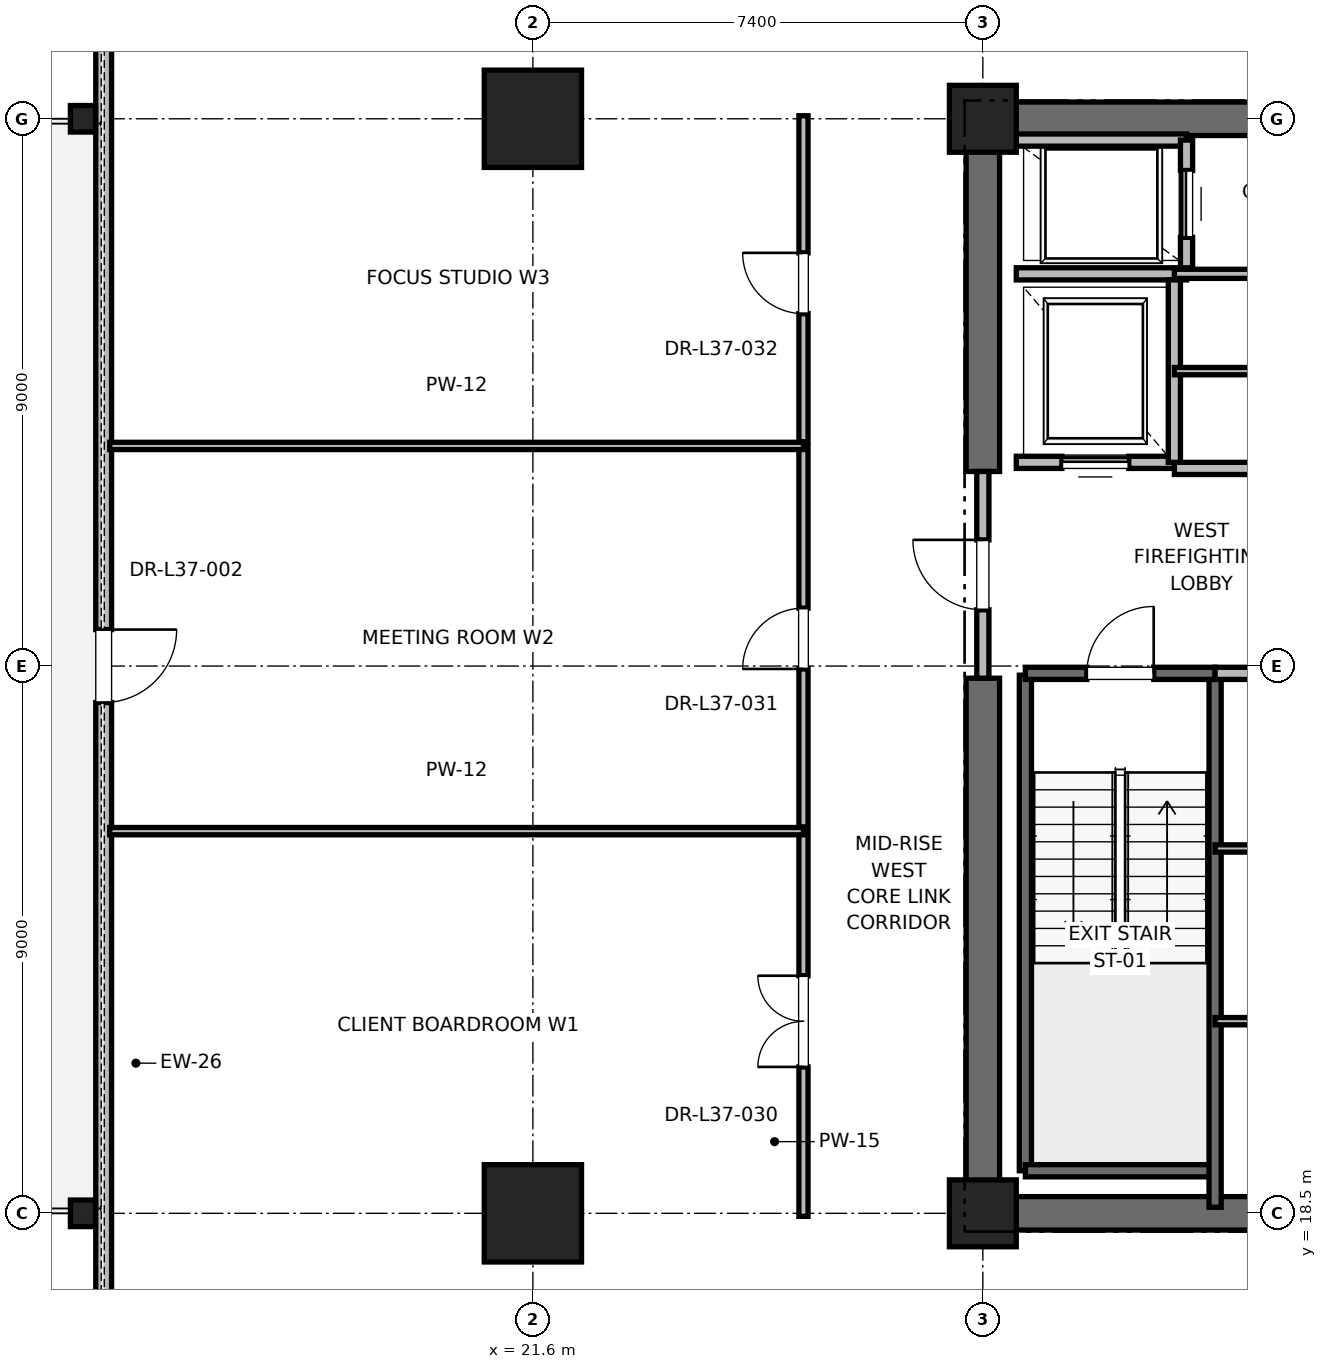
"""IFC4 building model, lengths in metres.
Left out: names, types, materials, properties, quantities, classifications, styles, units other than length and angle.
Written with IfcOpenShell. Run it as: python <this file> out.ifc"""

import sys

from ifc_helpers import new_model, si_unit, direction, frame, frame_2d, origin, origin_2d, place, context, subcontext, project, spatial, rectangle, i_section, extrude, element, fill, save


model = new_model("IFC4")
c1 = context("Model", 3, precision=1e-05, world=origin(), true_north=direction((0.0, 1.0)))
c2 = subcontext(c1, "Body", "Model", "MODEL_VIEW")
j1 = project(units=[si_unit("LENGTHUNIT", "METRE"), si_unit("PLANEANGLEUNIT", "RADIAN")], contexts=[c1])
p1 = place(None, origin())
s1 = spatial("IfcSite", under=j1, at=p1, CompositionType="ELEMENT")
p2 = place(p1, origin())
s2 = spatial("IfcBuilding", under=s1, at=p2, CompositionType="ELEMENT")
p3 = place(p2, frame((0.0, 0.0, 160.4)))
s3 = spatial("IfcBuildingStorey", under=s2, at=p3, CompositionType="ELEMENT", Elevation=160.4)
for number, where, z_axis, x_axis in (
    (1, (21.6, 18.5, 0.0), (0.0, 0.0, 1.0), (1.0, 0.0, 0.0)),
    (2, (21.6, 36.5, 0.0), (0.0, 0.0, 1.0), (1.0, 0.0, 0.0)),
):
    element("IfcColumn", number, at=place(p3, frame(where, z_axis=z_axis, x_axis=x_axis)), inside=s3, PredefinedType="COLUMN", context=c2, shape_type="SweptSolid", body=[
        extrude(rectangle(XDim=1.6, YDim=1.6, at=origin_2d()), origin(), (0.0, 0.0, 1.0), 4.0),
    ])
for number, where, z_axis, x_axis in (
    (3, (14.2, 18.5, 0.0), (0.0, 0.0, 1.0), (1.0, 0.0, 0.0)),
    (4, (14.2, 36.5, 0.0), (0.0, 0.0, 1.0), (1.0, 0.0, 0.0)),
):
    element("IfcColumn", number, at=place(p3, frame(where, z_axis=z_axis, x_axis=x_axis)), inside=s3, PredefinedType="COLUMN", context=c2, shape_type="SweptSolid", body=[
        extrude(i_section(OverallWidth=0.412, OverallDepth=0.437, WebThickness=0.036, FlangeThickness=0.058, FilletRadius=0.015, at=origin_2d()), origin(), (0.0, 0.0, 1.0), 4.0),
    ])
for number, where, z_axis, x_axis in (
    (5, (29.0, 18.5, 0.0), (0.0, 0.0, 1.0), (1.0, 0.0, 0.0)),
    (6, (29.0, 36.5, 0.0), (0.0, 0.0, 1.0), (1.0, 0.0, 0.0)),
):
    element("IfcColumn", number, at=place(p3, frame(where, z_axis=z_axis, x_axis=x_axis)), inside=s3, PredefinedType="PILASTER", context=c2, shape_type="SweptSolid", body=[
        extrude(rectangle(XDim=1.1, YDim=1.1, at=origin_2d()), origin(), (0.0, 0.0, 1.0), 4.0),
    ])
p4 = place(p3, frame((29.0, 18.5, 0.0), z_axis=(0.0, 0.0, 1.0), x_axis=(1.0, 0.0, 0.0)))
e7 = element("IfcWall", 7, at=p4, inside=s3, PredefinedType="SHEAR", context=c2, shape_type="SweptSolid", body=[
    extrude(rectangle(XDim=9.2, YDim=0.55, at=frame_2d((4.6, 0.0))), origin(), (0.0, 0.0, 1.0), 3.775),
])
p5 = place(p3, frame((29.0, 36.5, 0.0), z_axis=(0.0, 0.0, 1.0), x_axis=(1.0, 0.0, 0.0)))
e8 = element("IfcWall", 8, at=p5, inside=s3, PredefinedType="SHEAR", context=c2, shape_type="SweptSolid", body=[
    extrude(rectangle(XDim=5.8, YDim=0.55, at=frame_2d((2.9, 0.0))), origin(), (0.0, 0.0, 1.0), 3.775),
])
p6 = place(p3, frame((29.0, 18.5, 0.0), z_axis=(0.0, 0.0, 1.0), x_axis=(0.0, 1.0, 0.0)))
e9 = element("IfcWall", 9, at=p6, inside=s3, PredefinedType="SHEAR", context=c2, shape_type="SweptSolid", body=[
    extrude(rectangle(XDim=8.8, YDim=0.55, at=frame_2d((4.4, 0.0))), origin(), (0.0, 0.0, 1.0), 3.775),
])
p7 = place(p3, frame((29.0, 30.7, 0.0), z_axis=(0.0, 0.0, 1.0), x_axis=(0.0, 1.0, 0.0)))
e10 = element("IfcWall", 10, at=p7, inside=s3, PredefinedType="SHEAR", context=c2, shape_type="SweptSolid", body=[
    extrude(rectangle(XDim=5.8, YDim=0.55, at=frame_2d((2.9, 0.0))), origin(), (0.0, 0.0, 1.0), 3.775),
])
p8 = place(p3, frame((14.541, 46.161, 0.0), z_axis=(0.0, 0.0, 1.0), x_axis=(0.0, -1.0, 0.0)))
e11 = element("IfcWall", 11, at=p8, inside=s3, PredefinedType="PARAPET", context=c2, shape_type="SweptSolid", body=[
    extrude(rectangle(XDim=37.323, YDim=0.26, at=frame_2d((18.661, 0.0))), origin(), (0.0, 0.0, 1.0), 2.97),
])
p9 = place(p8, frame((4.2, 0.0, 0.85)))
e12 = element("IfcOpeningElement", 12, at=p9, cuts=e11, PredefinedType="OPENING", context=c2, shape_type="SweptSolid", body=[
    extrude(rectangle(XDim=2.0, YDim=2.3, at=frame_2d((1.0, 1.15))), frame((0.0, 0.13, 0.0), z_axis=(0.0, -1.0, 0.0), x_axis=(1.0, 0.0, 0.0)), (0.0, 0.0, 1.0), 0.26),
])
p10 = place(p8, frame((18.061, 0.0, 0.0)))
e13 = element("IfcOpeningElement", 13, at=p10, cuts=e11, PredefinedType="OPENING", context=c2, shape_type="SweptSolid", body=[
    extrude(rectangle(XDim=1.2, YDim=2.2, at=frame_2d((0.6, 1.1))), frame((0.0, 0.13, 0.0), z_axis=(0.0, -1.0, 0.0), x_axis=(1.0, 0.0, 0.0)), (0.0, 0.0, 1.0), 0.26),
])
p11 = place(p8, frame((31.123, 0.0, 0.85)))
e14 = element("IfcOpeningElement", 14, at=p11, cuts=e11, PredefinedType="OPENING", context=c2, shape_type="SweptSolid", body=[
    extrude(rectangle(XDim=2.0, YDim=2.3, at=frame_2d((1.0, 1.15))), frame((0.0, 0.13, 0.0), z_axis=(0.0, -1.0, 0.0), x_axis=(1.0, 0.0, 0.0)), (0.0, 0.0, 1.0), 0.26),
])
p12 = place(p3, frame((29.7, 19.2, 0.0), z_axis=(0.0, 0.0, 1.0), x_axis=(0.0, 1.0, 0.0)))
e15 = element("IfcWall", 15, at=p12, inside=s3, PredefinedType="SOLIDWALL", context=c2, shape_type="SweptSolid", body=[
    extrude(rectangle(XDim=8.15, YDim=0.2, at=frame_2d((4.075, 0.0))), origin(), (0.0, 0.0, 1.0), 3.775),
])
p13 = place(p3, frame((29.7, 19.2, 0.0), z_axis=(0.0, 0.0, 1.0), x_axis=(1.0, 0.0, 0.0)))
e16 = element("IfcWall", 16, at=p13, inside=s3, PredefinedType="SOLIDWALL", context=c2, shape_type="SweptSolid", body=[
    extrude(rectangle(XDim=3.12, YDim=0.2, at=frame_2d((1.56, 0.0))), origin(), (0.0, 0.0, 1.0), 3.775),
])
p14 = place(p3, frame((32.82, 18.6, 0.0), z_axis=(0.0, 0.0, 1.0), x_axis=(0.0, 1.0, 0.0)))
e17 = element("IfcWall", 17, at=p14, inside=s3, PredefinedType="SOLIDWALL", context=c2, shape_type="SweptSolid", body=[
    extrude(rectangle(XDim=8.78, YDim=0.2, at=frame_2d((4.39, 0.0))), origin(), (0.0, 0.0, 1.0), 3.775),
])
p15 = place(p3, frame((29.7, 27.38, 0.0), z_axis=(0.0, 0.0, 1.0), x_axis=(1.0, 0.0, 0.0)))
e18 = element("IfcWall", 18, at=p15, inside=s3, PredefinedType="SOLIDWALL", context=c2, shape_type="SweptSolid", body=[
    extrude(rectangle(XDim=3.12, YDim=0.2, at=frame_2d((1.56, 0.0))), origin(), (0.0, 0.0, 1.0), 3.775),
])
p16 = place(p15, frame((1.01, 0.0, 0.0)))
e19 = element("IfcOpeningElement", 19, at=p16, cuts=e18, PredefinedType="OPENING", context=c2, shape_type="SweptSolid", body=[
    extrude(rectangle(XDim=1.1, YDim=2.15, at=frame_2d((0.55, 1.075))), frame((0.0, 0.1, 0.0), z_axis=(0.0, -1.0, 0.0), x_axis=(1.0, 0.0, 0.0)), (0.0, 0.0, 1.0), 0.2),
])
p17 = place(p3, frame((29.0, 27.3, 0.0), z_axis=(0.0, 0.0, 1.0), x_axis=(0.0, 1.0, 0.0)))
e20 = element("IfcWall", 20, at=p17, inside=s3, PredefinedType="PARTITIONING", context=c2, shape_type="SweptSolid", body=[
    extrude(rectangle(XDim=3.4, YDim=0.2, at=frame_2d((1.7, 0.0))), origin(), (0.0, 0.0, 1.0), 2.755),
])
p18 = place(p17, frame((1.125, 0.0, 0.0)))
e21 = element("IfcOpeningElement", 21, at=p18, cuts=e20, PredefinedType="OPENING", context=c2, shape_type="SweptSolid", body=[
    extrude(rectangle(XDim=1.15, YDim=2.2, at=frame_2d((0.575, 1.1))), frame((0.0, 0.1, 0.0), z_axis=(0.0, -1.0, 0.0), x_axis=(1.0, 0.0, 0.0)), (0.0, 0.0, 1.0), 0.2),
])
p19 = place(p3, frame((32.82, 27.38, 0.0), z_axis=(0.0, 0.0, 1.0), x_axis=(1.0, 0.0, 0.0)))
e22 = element("IfcWall", 22, at=p19, inside=s3, PredefinedType="PARTITIONING", context=c2, shape_type="SweptSolid", body=[
    extrude(rectangle(XDim=5.62, YDim=0.2, at=frame_2d((2.81, 0.0))), origin(), (0.0, 0.0, 1.0), 3.775),
])
p20 = place(p3, frame((32.15, 30.75, 0.0), z_axis=(0.0, 0.0, 1.0), x_axis=(1.0, 0.0, 0.0)))
e23 = element("IfcWall", 23, at=p20, inside=s3, PredefinedType="PARTITIONING", context=c2, shape_type="SweptSolid", body=[
    extrude(rectangle(XDim=3.13, YDim=0.2, at=frame_2d((1.565, 0.0))), origin(), (0.0, 0.0, 1.0), 3.775),
])
p21 = place(p3, frame((29.55, 30.85, 0.0), z_axis=(0.0, 0.0, 1.0), x_axis=(1.0, 0.0, 0.0)))
e24 = element("IfcWall", 24, at=p21, inside=s3, PredefinedType="SOLIDWALL", context=c2, shape_type="SweptSolid", body=[
    extrude(rectangle(XDim=2.6, YDim=0.2, at=frame_2d((1.3, 0.0))), origin(), (0.0, 0.0, 1.0), 2.755),
])
p22 = place(p21, frame((0.75, 0.0, 0.0)))
e25 = element("IfcOpeningElement", 25, at=p22, cuts=e24, PredefinedType="OPENING", context=c2, shape_type="SweptSolid", body=[
    extrude(rectangle(XDim=1.1, YDim=2.2, at=frame_2d((0.55, 1.1))), frame((0.0, 0.1, 0.0), z_axis=(0.0, -1.0, 0.0), x_axis=(1.0, 0.0, 0.0)), (0.0, 0.0, 1.0), 0.2),
])
p23 = place(p3, frame((29.55, 33.95, 0.0), z_axis=(0.0, 0.0, 1.0), x_axis=(1.0, 0.0, 0.0)))
e26 = element("IfcWall", 26, at=p23, inside=s3, PredefinedType="SOLIDWALL", context=c2, shape_type="SweptSolid", body=[
    extrude(rectangle(XDim=2.8, YDim=0.2, at=frame_2d((1.4, 0.0))), origin(), (0.0, 0.0, 1.0), 3.775),
])
p24 = place(p3, frame((32.15, 30.85, 0.0), z_axis=(0.0, 0.0, 1.0), x_axis=(0.0, 1.0, 0.0)))
e27 = element("IfcWall", 27, at=p24, inside=s3, PredefinedType="SOLIDWALL", context=c2, shape_type="SweptSolid", body=[
    extrude(rectangle(XDim=3.0, YDim=0.2, at=frame_2d((1.5, 0.0))), origin(), (0.0, 0.0, 1.0), 3.775),
])
p25 = place(p3, frame((32.35, 36.15, 0.0), z_axis=(0.0, 0.0, 1.0), x_axis=(-1.0, 0.0, 0.0)))
e28 = element("IfcWall", 28, at=p25, inside=s3, PredefinedType="SOLIDWALL", context=c2, shape_type="SweptSolid", body=[
    extrude(rectangle(XDim=2.8, YDim=0.2, at=frame_2d((1.4, 0.0))), origin(), (0.0, 0.0, 1.0), 2.985),
])
p26 = place(p3, frame((32.35, 34.05, 0.0), z_axis=(0.0, 0.0, 1.0), x_axis=(0.0, 1.0, 0.0)))
e29 = element("IfcWall", 29, at=p26, inside=s3, PredefinedType="SOLIDWALL", context=c2, shape_type="SweptSolid", body=[
    extrude(rectangle(XDim=2.1, YDim=0.2, at=frame_2d((1.05, 0.0))), origin(), (0.0, 0.0, 1.0), 3.775),
])
p27 = place(p26, frame((0.5, 0.0, 0.0)))
e30 = element("IfcOpeningElement", 30, at=p27, cuts=e29, PredefinedType="OPENING", context=c2, shape_type="SweptSolid", body=[
    extrude(rectangle(XDim=1.1, YDim=2.2, at=frame_2d((0.55, 1.1))), frame((0.0, 0.1, 0.0), z_axis=(0.0, -1.0, 0.0), x_axis=(1.0, 0.0, 0.0)), (0.0, 0.0, 1.0), 0.2),
])
p28 = place(p3, frame((32.15, 33.95, 0.0), z_axis=(0.0, 0.0, 1.0), x_axis=(1.0, 0.0, 0.0)))
e31 = element("IfcWall", 31, at=p28, inside=s3, PredefinedType="PARTITIONING", context=c2, shape_type="SweptSolid", body=[
    extrude(rectangle(XDim=3.13, YDim=0.15, at=frame_2d((1.565, 0.0))), origin(), (0.0, 0.0, 1.0), 2.85),
])
p29 = place(p3, frame((32.15, 32.35, 0.0), z_axis=(0.0, 0.0, 1.0), x_axis=(1.0, 0.0, 0.0)))
e32 = element("IfcWall", 32, at=p29, inside=s3, PredefinedType="PARTITIONING", context=c2, shape_type="SweptSolid", body=[
    extrude(rectangle(XDim=3.13, YDim=0.12, at=frame_2d((1.565, 0.0))), origin(), (0.0, 0.0, 1.0), 2.85),
])
for number, where, z_axis, x_axis in (
    (33, (32.82, 21.66, 0.0), (0.0, 0.0, 1.0), (1.0, 0.0, 0.0)),
    (34, (32.82, 24.5, 0.0), (0.0, 0.0, 1.0), (1.0, 0.0, 0.0)),
):
    element("IfcWall", number, at=place(p3, frame(where, z_axis=z_axis, x_axis=x_axis)), inside=s3, PredefinedType="PARTITIONING", context=c2, shape_type="SweptSolid", body=[
        extrude(rectangle(XDim=5.23, YDim=0.12, at=frame_2d((2.615, 0.0))), origin(), (0.0, 0.0, 1.0), 2.85),
    ])
p30 = place(p3, frame((26.05, 18.45, 0.0), z_axis=(0.0, 0.0, 1.0), x_axis=(0.0, 1.0, 0.0)))
e35 = element("IfcWall", 35, at=p30, inside=s3, PredefinedType="PARTITIONING", context=c2, shape_type="SweptSolid", body=[
    extrude(rectangle(XDim=6.335, YDim=0.15, at=frame_2d((3.167, 0.0))), origin(), (0.0, 0.0, 1.0), 2.85),
])
p31 = place(p30, frame((2.458, 0.0, 0.0)))
e36 = element("IfcOpeningElement", 36, at=p31, cuts=e35, PredefinedType="OPENING", context=c2, shape_type="SweptSolid", body=[
    extrude(rectangle(XDim=1.5, YDim=2.25, at=frame_2d((0.75, 1.125))), frame((0.0, 0.075, 0.0), z_axis=(0.0, -1.0, 0.0), x_axis=(1.0, 0.0, 0.0)), (0.0, 0.0, 1.0), 0.15),
])
p32 = place(p3, frame((14.641, 24.785, 0.0), z_axis=(0.0, 0.0, 1.0), x_axis=(1.0, 0.0, 0.0)))
e37 = element("IfcWall", 37, at=p32, inside=s3, PredefinedType="PARTITIONING", context=c2, shape_type="SweptSolid", body=[
    extrude(rectangle(XDim=11.409, YDim=0.12, at=frame_2d((5.705, 0.0))), origin(), (0.0, 0.0, 1.0), 2.85),
])
p33 = place(p3, frame((26.05, 24.855, 0.0), z_axis=(0.0, 0.0, 1.0), x_axis=(0.0, 1.0, 0.0)))
e38 = element("IfcWall", 38, at=p33, inside=s3, PredefinedType="PARTITIONING", context=c2, shape_type="SweptSolid", body=[
    extrude(rectangle(XDim=6.265, YDim=0.15, at=frame_2d((3.133, 0.0))), origin(), (0.0, 0.0, 1.0), 2.85),
])
p34 = place(p33, frame((2.597, 0.0, 0.0)))
e39 = element("IfcOpeningElement", 39, at=p34, cuts=e38, PredefinedType="OPENING", context=c2, shape_type="SweptSolid", body=[
    extrude(rectangle(XDim=1.0, YDim=2.15, at=frame_2d((0.5, 1.075))), frame((0.0, 0.075, 0.0), z_axis=(0.0, -1.0, 0.0), x_axis=(1.0, 0.0, 0.0)), (0.0, 0.0, 1.0), 0.15),
])
p35 = place(p3, frame((14.641, 31.12, 0.0), z_axis=(0.0, 0.0, 1.0), x_axis=(1.0, 0.0, 0.0)))
e40 = element("IfcWall", 40, at=p35, inside=s3, PredefinedType="PARTITIONING", context=c2, shape_type="SweptSolid", body=[
    extrude(rectangle(XDim=11.409, YDim=0.12, at=frame_2d((5.705, 0.0))), origin(), (0.0, 0.0, 1.0), 2.85),
])
p36 = place(p3, frame((26.05, 31.19, 0.0), z_axis=(0.0, 0.0, 1.0), x_axis=(0.0, 1.0, 0.0)))
e41 = element("IfcWall", 41, at=p36, inside=s3, PredefinedType="PARTITIONING", context=c2, shape_type="SweptSolid", body=[
    extrude(rectangle(XDim=5.36, YDim=0.15, at=frame_2d((2.68, 0.0))), origin(), (0.0, 0.0, 1.0), 2.85),
])
p37 = place(p36, frame((2.105, 0.0, 0.0)))
e42 = element("IfcOpeningElement", 42, at=p37, cuts=e41, PredefinedType="OPENING", context=c2, shape_type="SweptSolid", body=[
    extrude(rectangle(XDim=1.0, YDim=2.15, at=frame_2d((0.5, 1.075))), frame((0.0, 0.075, 0.0), z_axis=(0.0, -1.0, 0.0), x_axis=(1.0, 0.0, 0.0)), (0.0, 0.0, 1.0), 0.15),
])
p38 = place(p10, origin())
e43 = element("IfcDoor", 43, at=p38, inside=s3, OperationType="SINGLE_SWING_LEFT", PredefinedType="DOOR", context=c2, shape_type="SweptSolid", body=[
    extrude(rectangle(XDim=1.2, YDim=2.2, at=frame_2d((0.6, 1.1))), frame((0.0, 0.025, 0.0), z_axis=(0.0, -1.0, 0.0), x_axis=(1.0, 0.0, 0.0)), (0.0, 0.0, 1.0), 0.05),
])
fill(e13, e43)
p39 = place(p16, origin())
e44 = element("IfcDoor", 44, at=p39, inside=s3, OperationType="SINGLE_SWING_RIGHT", PredefinedType="DOOR", context=c2, shape_type="SweptSolid", body=[
    extrude(rectangle(XDim=1.1, YDim=2.15, at=frame_2d((0.55, 1.075))), frame((0.0, 0.025, 0.0), z_axis=(0.0, -1.0, 0.0), x_axis=(1.0, 0.0, 0.0)), (0.0, 0.0, 1.0), 0.05),
])
fill(e19, e44)
p40 = place(p18, origin())
e45 = element("IfcDoor", 45, at=p40, inside=s3, OperationType="SINGLE_SWING_RIGHT", PredefinedType="DOOR", context=c2, shape_type="SweptSolid", body=[
    extrude(rectangle(XDim=1.15, YDim=2.2, at=frame_2d((0.575, 1.1))), frame((0.0, 0.025, 0.0), z_axis=(0.0, -1.0, 0.0), x_axis=(1.0, 0.0, 0.0)), (0.0, 0.0, 1.0), 0.05),
])
fill(e21, e45)
p41 = place(p22, origin())
e46 = element("IfcDoor", 46, at=p41, inside=s3, OperationType="SLIDING_TO_RIGHT", PredefinedType="DOOR", context=c2, shape_type="SweptSolid", body=[
    extrude(rectangle(XDim=1.1, YDim=2.2, at=frame_2d((0.55, 1.1))), frame((0.0, 0.025, 0.0), z_axis=(0.0, -1.0, 0.0), x_axis=(1.0, 0.0, 0.0)), (0.0, 0.0, 1.0), 0.05),
])
fill(e25, e46)
p42 = place(p27, origin())
e47 = element("IfcDoor", 47, at=p42, inside=s3, OperationType="SLIDING_TO_RIGHT", PredefinedType="DOOR", context=c2, shape_type="SweptSolid", body=[
    extrude(rectangle(XDim=1.1, YDim=2.2, at=frame_2d((0.55, 1.1))), frame((0.0, 0.025, 0.0), z_axis=(0.0, -1.0, 0.0), x_axis=(1.0, 0.0, 0.0)), (0.0, 0.0, 1.0), 0.05),
])
fill(e30, e47)
p43 = place(p31, origin())
e48 = element("IfcDoor", 48, at=p43, inside=s3, OperationType="DOUBLE_DOOR_SINGLE_SWING", PredefinedType="DOOR", context=c2, shape_type="SweptSolid", body=[
    extrude(rectangle(XDim=1.5, YDim=2.25, at=frame_2d((0.75, 1.125))), frame((0.0, 0.025, 0.0), z_axis=(0.0, -1.0, 0.0), x_axis=(1.0, 0.0, 0.0)), (0.0, 0.0, 1.0), 0.05),
])
fill(e36, e48)
p44 = place(p34, origin())
e49 = element("IfcDoor", 49, at=p44, inside=s3, OperationType="SINGLE_SWING_LEFT", PredefinedType="DOOR", context=c2, shape_type="SweptSolid", body=[
    extrude(rectangle(XDim=1.0, YDim=2.15, at=frame_2d((0.5, 1.075))), frame((0.0, 0.025, 0.0), z_axis=(0.0, -1.0, 0.0), x_axis=(1.0, 0.0, 0.0)), (0.0, 0.0, 1.0), 0.05),
])
fill(e39, e49)
p45 = place(p37, origin())
e50 = element("IfcDoor", 50, at=p45, inside=s3, OperationType="SINGLE_SWING_RIGHT", PredefinedType="DOOR", context=c2, shape_type="SweptSolid", body=[
    extrude(rectangle(XDim=1.0, YDim=2.15, at=frame_2d((0.5, 1.075))), frame((0.0, 0.025, 0.0), z_axis=(0.0, -1.0, 0.0), x_axis=(1.0, 0.0, 0.0)), (0.0, 0.0, 1.0), 0.05),
])
fill(e42, e50)
save(model, sys.argv[1])
